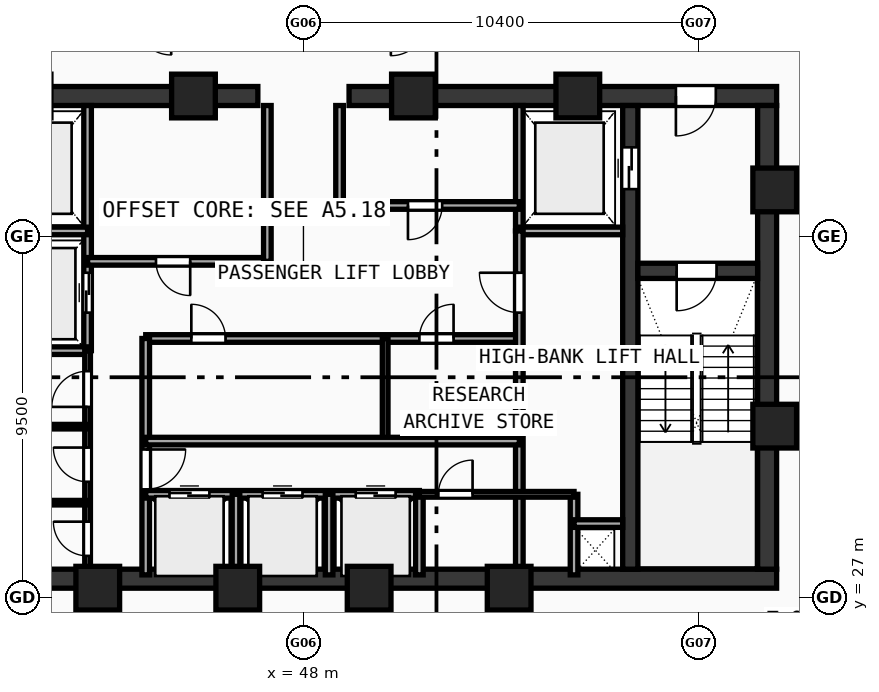
"""IFC4 building model, lengths in metres.
Left out: names, types, materials, properties, quantities, classifications, styles, units other than length and angle.
Written with IfcOpenShell. Run it as: python <this file> out.ifc"""

import sys

from ifc_helpers import new_model, si_unit, direction, frame, frame_2d, origin, origin_with_axes, origin_2d, place, context, subcontext, project, spatial, rectangle, hollow_rectangle, extrude, source, transform, mapped, element, fill, save


model = new_model("IFC4")
c1 = context("Model", 3, precision=1e-05, world=origin(), true_north=direction((0.0, 1.0)))
c2 = subcontext(c1, "Body", "Model", "MODEL_VIEW")
j1 = project(units=[si_unit("LENGTHUNIT", "METRE"), si_unit("PLANEANGLEUNIT", "RADIAN")], contexts=[c1])
p1 = place(None, origin())
s1 = spatial("IfcSite", under=j1, at=p1, CompositionType="ELEMENT")
p2 = place(p1, origin())
s2 = spatial("IfcBuilding", under=s1, at=p2, CompositionType="ELEMENT")
p3 = place(p2, frame((0.0, 0.0, 285.02)))
s3 = spatial("IfcBuildingStorey", under=s2, at=p3, CompositionType="ELEMENT", Elevation=285.02)
p4 = place(p3, frame((35.55, 27.5, 0.0), z_axis=(0.0, 0.0, 1.0), x_axis=(1.0, 0.0, 0.0)))
e1 = element("IfcWall", 1, at=p4, inside=s3, PredefinedType="SHEAR", context=c2, shape_type="SweptSolid", body=[
    extrude(rectangle(XDim=24.9, YDim=0.5, at=frame_2d((12.45, 0.0))), origin(), (0.0, 0.0, 1.0), 3.47),
])
p5 = place(p3, frame((35.55, 40.2, 0.0), z_axis=(0.0, 0.0, 1.0), x_axis=(1.0, 0.0, 0.0)))
e2 = element("IfcWall", 2, at=p5, inside=s3, PredefinedType="SHEAR", context=c2, shape_type="SweptSolid", body=[
    extrude(rectangle(XDim=11.25, YDim=0.5, at=frame_2d((5.625, 0.0))), origin(), (0.0, 0.0, 1.0), 3.47),
])
p6 = place(p5, frame((1.6, 0.0, 0.0)))
e3 = element("IfcOpeningElement", 3, at=p6, cuts=e2, PredefinedType="OPENING", context=c2, shape_type="SweptSolid", body=[
    extrude(rectangle(XDim=1.05, YDim=2.1, at=frame_2d((0.525, 1.05))), frame((0.0, 0.26, 0.0), z_axis=(0.0, -1.0, 0.0), x_axis=(1.0, 0.0, 0.0)), (0.0, 0.0, 1.0), 0.52),
])
p7 = place(p3, frame((49.2, 40.2, 0.0), z_axis=(0.0, 0.0, 1.0), x_axis=(1.0, 0.0, 0.0)))
e4 = element("IfcWall", 4, at=p7, inside=s3, PredefinedType="SHEAR", context=c2, shape_type="SweptSolid", body=[
    extrude(rectangle(XDim=11.25, YDim=0.5, at=frame_2d((5.625, 0.0))), origin(), (0.0, 0.0, 1.0), 3.47),
])
p8 = place(p7, frame((8.6, 0.0, 0.0)))
e5 = element("IfcOpeningElement", 5, at=p8, cuts=e4, PredefinedType="OPENING", context=c2, shape_type="SweptSolid", body=[
    extrude(rectangle(XDim=1.05, YDim=2.1, at=frame_2d((0.525, 1.05))), frame((0.0, 0.26, 0.0), z_axis=(0.0, -1.0, 0.0), x_axis=(1.0, 0.0, 0.0)), (0.0, 0.0, 1.0), 0.52),
])
p9 = place(p3, frame((60.2, 27.75, 0.0), z_axis=(0.0, 0.0, 1.0), x_axis=(0.0, 1.0, 0.0)))
e6 = element("IfcWall", 6, at=p9, inside=s3, PredefinedType="SHEAR", context=c2, shape_type="SweptSolid", body=[
    extrude(rectangle(XDim=12.2, YDim=0.5, at=frame_2d((6.1, 0.0))), origin(), (0.0, 0.0, 1.0), 3.47),
])
p10 = place(p3, frame((56.6, 27.75, 0.0), z_axis=(0.0, 0.0, 1.0), x_axis=(0.0, 1.0, 0.0)))
e7 = element("IfcWall", 7, at=p10, inside=s3, PredefinedType="SHEAR", context=c2, shape_type="SweptSolid", body=[
    extrude(rectangle(XDim=12.2, YDim=0.4, at=frame_2d((6.1, 0.0))), origin(), (0.0, 0.0, 1.0), 3.47),
])
p11 = place(p10, frame((10.0, 0.0, 0.0)))
e8 = element("IfcOpeningElement", 8, at=p11, cuts=e7, PredefinedType="OPENING", context=c2, shape_type="SweptSolid", body=[
    extrude(rectangle(XDim=1.1, YDim=2.1, at=frame_2d((0.55, 1.05))), frame((0.0, 0.21, 0.0), z_axis=(0.0, -1.0, 0.0), x_axis=(1.0, 0.0, 0.0)), (0.0, 0.0, 1.0), 0.42),
])
p12 = place(p3, frame((56.8, 35.6, 0.0), z_axis=(0.0, 0.0, 1.0), x_axis=(1.0, 0.0, 0.0)))
e9 = element("IfcWall", 9, at=p12, inside=s3, PredefinedType="SHEAR", context=c2, shape_type="SweptSolid", body=[
    extrude(rectangle(XDim=3.15, YDim=0.4, at=frame_2d((1.575, 0.0))), origin(), (0.0, 0.0, 1.0), 3.47),
])
p13 = place(p12, frame((1.02, 0.0, 0.0)))
e10 = element("IfcOpeningElement", 10, at=p13, cuts=e9, PredefinedType="OPENING", context=c2, shape_type="SweptSolid", body=[
    extrude(rectangle(XDim=1.05, YDim=2.1, at=frame_2d((0.525, 1.05))), frame((0.0, 0.21, 0.0), z_axis=(0.0, -1.0, 0.0), x_axis=(1.0, 0.0, 0.0)), (0.0, 0.0, 1.0), 0.42),
])
m1 = source(origin(), c2, "Body", "SweptSolid", [
    extrude(hollow_rectangle(XDim=1.15, YDim=1.15, WallThickness=0.048, at=origin_2d()), origin(), (0.0, 0.0, 1.0), 3.73),
])
for number, where, z_axis, x_axis in (
    (11, (42.588, 27.25, -0.26), (0.0, 0.0, 1.0), (1.0, 0.0, 0.0)),
    (12, (46.272, 27.25, -0.26), (0.0, 0.0, 1.0), (1.0, 0.0, 0.0)),
    (13, (49.729, 27.25, -0.26), (0.0, 0.0, 1.0), (1.0, 0.0, 0.0)),
    (14, (53.412, 27.25, -0.26), (0.0, 0.0, 1.0), (1.0, 0.0, 0.0)),
    (15, (60.4, 31.513, -0.26), (0.0, 0.0, 1.0), (1.0, 0.0, 0.0)),
    (16, (60.4, 37.729, -0.26), (0.0, 0.0, 1.0), (1.0, 0.0, 0.0)),
    (17, (55.219, 40.2, -0.26), (0.0, 0.0, 1.0), (1.0, 0.0, 0.0)),
    (18, (50.894, 40.2, -0.26), (0.0, 0.0, 1.0), (1.0, 0.0, 0.0)),
    (19, (45.106, 40.2, -0.26), (0.0, 0.0, 1.0), (1.0, 0.0, 0.0)),
):
    element("IfcColumn", number, at=place(p3, frame(where, z_axis=z_axis, x_axis=x_axis)), inside=s3, PredefinedType="COLUMN", context=c2, shape_type="MappedRepresentation", body=[
        mapped(m1, transform((0.0, 0.0, 0.0), scale=1.0)),
    ])
p14 = place(p3, frame((42.32, 33.5, 0.0), z_axis=(0.0, 0.0, 1.0), x_axis=(0.0, 1.0, 0.0)))
e20 = element("IfcWall", 20, at=p14, inside=s3, PredefinedType="SOLIDWALL", context=c2, shape_type="SweptSolid", body=[
    extrude(rectangle(XDim=6.45, YDim=0.2, at=frame_2d((3.225, 0.0))), origin(), (0.0, 0.0, 1.0), 3.47),
])
p15 = place(p14, frame((1.0, 0.0, 0.0)))
e21 = element("IfcOpeningElement", 21, at=p15, cuts=e20, PredefinedType="OPENING", context=c2, shape_type="SweptSolid", body=[
    extrude(rectangle(XDim=1.05, YDim=2.1, at=frame_2d((0.525, 1.05))), frame((0.0, 0.11, 0.0), z_axis=(0.0, -1.0, 0.0), x_axis=(1.0, 0.0, 0.0)), (0.0, 0.0, 1.0), 0.22),
])
for number, where, z_axis, x_axis in (
    (22, (39.6, 36.65, 0.0), (0.0, 0.0, 1.0), (1.0, 0.0, 0.0)),
    (23, (39.6, 33.5, 0.0), (0.0, 0.0, 1.0), (1.0, 0.0, 0.0)),
):
    element("IfcWall", number, at=place(p3, frame(where, z_axis=z_axis, x_axis=x_axis)), inside=s3, PredefinedType="SOLIDWALL", context=c2, shape_type="SweptSolid", body=[
        extrude(rectangle(XDim=2.72, YDim=0.2, at=frame_2d((1.36, 0.0))), origin(), (0.0, 0.0, 1.0), 3.47),
    ])
p16 = place(p3, frame((53.68, 36.65, 0.0), z_axis=(0.0, 0.0, 1.0), x_axis=(0.0, 1.0, 0.0)))
e24 = element("IfcWall", 24, at=p16, inside=s3, PredefinedType="SOLIDWALL", context=c2, shape_type="SweptSolid", body=[
    extrude(rectangle(XDim=3.3, YDim=0.2, at=frame_2d((1.65, 0.0))), origin(), (0.0, 0.0, 1.0), 3.47),
])
p17 = place(p3, frame((53.68, 36.65, 0.0), z_axis=(0.0, 0.0, 1.0), x_axis=(1.0, 0.0, 0.0)))
e25 = element("IfcWall", 25, at=p17, inside=s3, PredefinedType="SOLIDWALL", context=c2, shape_type="SweptSolid", body=[
    extrude(rectangle(XDim=2.72, YDim=0.2, at=frame_2d((1.36, 0.0))), origin(), (0.0, 0.0, 1.0), 3.47),
])
p18 = place(p3, frame((42.32, 35.85, 0.0), z_axis=(0.0, 0.0, 1.0), x_axis=(1.0, 0.0, 0.0)))
e26 = element("IfcWall", 26, at=p18, inside=s3, PredefinedType="SOLIDWALL", context=c2, shape_type="SweptSolid", body=[
    extrude(rectangle(XDim=4.73, YDim=0.2, at=frame_2d((2.365, 0.0))), origin(), (0.0, 0.0, 1.0), 3.47),
])
p19 = place(p18, frame((1.8, 0.0, 0.0)))
e27 = element("IfcOpeningElement", 27, at=p19, cuts=e26, PredefinedType="OPENING", context=c2, shape_type="SweptSolid", body=[
    extrude(rectangle(XDim=0.9, YDim=2.1, at=frame_2d((0.45, 1.05))), frame((0.0, 0.11, 0.0), z_axis=(0.0, -1.0, 0.0), x_axis=(1.0, 0.0, 0.0)), (0.0, 0.0, 1.0), 0.22),
])
p20 = place(p3, frame((48.95, 37.32, 0.0), z_axis=(0.0, 0.0, 1.0), x_axis=(1.0, 0.0, 0.0)))
e28 = element("IfcWall", 28, at=p20, inside=s3, PredefinedType="SOLIDWALL", context=c2, shape_type="SweptSolid", body=[
    extrude(rectangle(XDim=4.73, YDim=0.2, at=frame_2d((2.365, 0.0))), origin(), (0.0, 0.0, 1.0), 3.47),
])
p21 = place(p20, frame((1.8, 0.0, 0.0)))
e29 = element("IfcOpeningElement", 29, at=p21, cuts=e28, PredefinedType="OPENING", context=c2, shape_type="SweptSolid", body=[
    extrude(rectangle(XDim=0.9, YDim=2.1, at=frame_2d((0.45, 1.05))), frame((0.0, 0.11, 0.0), z_axis=(0.0, -1.0, 0.0), x_axis=(1.0, 0.0, 0.0)), (0.0, 0.0, 1.0), 0.22),
])
p22 = place(p3, frame((47.05, 35.85, 0.0), z_axis=(0.0, 0.0, 1.0), x_axis=(0.0, 1.0, 0.0)))
e30 = element("IfcWall", 30, at=p22, inside=s3, PredefinedType="SOLIDWALL", context=c2, shape_type="SweptSolid", body=[
    extrude(rectangle(XDim=4.1, YDim=0.2, at=frame_2d((2.05, 0.0))), origin(), (0.0, 0.0, 1.0), 3.47),
])
p23 = place(p3, frame((48.95, 37.32, 0.0), z_axis=(0.0, 0.0, 1.0), x_axis=(0.0, 1.0, 0.0)))
e31 = element("IfcWall", 31, at=p23, inside=s3, PredefinedType="SOLIDWALL", context=c2, shape_type="SweptSolid", body=[
    extrude(rectangle(XDim=2.63, YDim=0.2, at=frame_2d((1.315, 0.0))), origin(), (0.0, 0.0, 1.0), 3.47),
])
p24 = place(p3, frame((43.85, 33.82, 0.0), z_axis=(0.0, 0.0, 1.0), x_axis=(1.0, 0.0, 0.0)))
e32 = element("IfcWall", 32, at=p24, inside=s3, PredefinedType="SOLIDWALL", context=c2, shape_type="SweptSolid", body=[
    extrude(rectangle(XDim=9.83, YDim=0.2, at=frame_2d((4.915, 0.0))), origin(), (0.0, 0.0, 1.0), 3.47),
])
p25 = place(p24, frame((1.2, 0.0, 0.0)))
e33 = element("IfcOpeningElement", 33, at=p25, cuts=e32, PredefinedType="OPENING", context=c2, shape_type="SweptSolid", body=[
    extrude(rectangle(XDim=0.9, YDim=2.1, at=frame_2d((0.45, 1.05))), frame((0.0, 0.11, 0.0), z_axis=(0.0, -1.0, 0.0), x_axis=(1.0, 0.0, 0.0)), (0.0, 0.0, 1.0), 0.22),
])
p26 = place(p24, frame((7.2, 0.0, 0.0)))
e34 = element("IfcOpeningElement", 34, at=p26, cuts=e32, PredefinedType="OPENING", context=c2, shape_type="SweptSolid", body=[
    extrude(rectangle(XDim=0.9, YDim=2.1, at=frame_2d((0.45, 1.05))), frame((0.0, 0.11, 0.0), z_axis=(0.0, -1.0, 0.0), x_axis=(1.0, 0.0, 0.0)), (0.0, 0.0, 1.0), 0.22),
])
p27 = place(p3, frame((43.85, 27.6, 0.0), z_axis=(0.0, 0.0, 1.0), x_axis=(0.0, 1.0, 0.0)))
e35 = element("IfcWall", 35, at=p27, inside=s3, PredefinedType="SOLIDWALL", context=c2, shape_type="SweptSolid", body=[
    extrude(rectangle(XDim=6.22, YDim=0.2, at=frame_2d((3.11, 0.0))), origin(), (0.0, 0.0, 1.0), 3.47),
])
p28 = place(p27, frame((2.25, 0.0, 0.0)))
e36 = element("IfcOpeningElement", 36, at=p28, cuts=e35, PredefinedType="OPENING", context=c2, shape_type="SweptSolid", body=[
    extrude(rectangle(XDim=1.05, YDim=2.1, at=frame_2d((0.525, 1.05))), frame((0.0, 0.11, 0.0), z_axis=(0.0, -1.0, 0.0), x_axis=(1.0, 0.0, 0.0)), (0.0, 0.0, 1.0), 0.22),
])
p29 = place(p3, frame((53.68, 27.6, 0.0), z_axis=(0.0, 0.0, 1.0), x_axis=(0.0, 1.0, 0.0)))
e37 = element("IfcWall", 37, at=p29, inside=s3, PredefinedType="SOLIDWALL", context=c2, shape_type="SweptSolid", body=[
    extrude(rectangle(XDim=9.05, YDim=0.2, at=frame_2d((4.525, 0.0))), origin(), (0.0, 0.0, 1.0), 3.47),
])
p30 = place(p29, frame((6.9, 0.0, 0.0)))
e38 = element("IfcOpeningElement", 38, at=p30, cuts=e37, PredefinedType="OPENING", context=c2, shape_type="SweptSolid", body=[
    extrude(rectangle(XDim=1.05, YDim=2.1, at=frame_2d((0.525, 1.05))), frame((0.0, 0.11, 0.0), z_axis=(0.0, -1.0, 0.0), x_axis=(1.0, 0.0, 0.0)), (0.0, 0.0, 1.0), 0.22),
])
p31 = place(p3, frame((50.15, 31.12, 0.0), z_axis=(0.0, 0.0, 1.0), x_axis=(0.0, 1.0, 0.0)))
e39 = element("IfcWall", 39, at=p31, inside=s3, PredefinedType="PARTITIONING", context=c2, shape_type="SweptSolid", body=[
    extrude(rectangle(XDim=2.7, YDim=0.15, at=frame_2d((1.35, 0.0))), origin(), (0.0, 0.0, 1.0), 3.47),
])
p32 = place(p3, frame((43.85, 29.72, 0.0), z_axis=(0.0, 0.0, 1.0), x_axis=(1.0, 0.0, 0.0)))
e40 = element("IfcWall", 40, at=p32, inside=s3, PredefinedType="SOLIDWALL", context=c2, shape_type="SweptSolid", body=[
    extrude(rectangle(XDim=7.2, YDim=0.2, at=frame_2d((3.6, 0.0))), origin(), (0.0, 0.0, 1.0), 3.47),
])
p33 = place(p32, frame((0.625, 0.0, 0.0)))
e41 = element("IfcOpeningElement", 41, at=p33, cuts=e40, PredefinedType="OPENING", context=c2, shape_type="SweptSolid", body=[
    extrude(rectangle(XDim=1.05, YDim=2.1, at=frame_2d((0.525, 1.05))), frame((0.0, 0.11, 0.0), z_axis=(0.0, -1.0, 0.0), x_axis=(1.0, 0.0, 0.0)), (0.0, 0.0, 1.0), 0.22),
])
p34 = place(p32, frame((3.075, 0.0, 0.0)))
e42 = element("IfcOpeningElement", 42, at=p34, cuts=e40, PredefinedType="OPENING", context=c2, shape_type="SweptSolid", body=[
    extrude(rectangle(XDim=1.05, YDim=2.1, at=frame_2d((0.525, 1.05))), frame((0.0, 0.11, 0.0), z_axis=(0.0, -1.0, 0.0), x_axis=(1.0, 0.0, 0.0)), (0.0, 0.0, 1.0), 0.22),
])
p35 = place(p32, frame((5.525, 0.0, 0.0)))
e43 = element("IfcOpeningElement", 43, at=p35, cuts=e40, PredefinedType="OPENING", context=c2, shape_type="SweptSolid", body=[
    extrude(rectangle(XDim=1.05, YDim=2.1, at=frame_2d((0.525, 1.05))), frame((0.0, 0.11, 0.0), z_axis=(0.0, -1.0, 0.0), x_axis=(1.0, 0.0, 0.0)), (0.0, 0.0, 1.0), 0.22),
])
p36 = place(p3, frame((51.05, 27.6, 0.0), z_axis=(0.0, 0.0, 1.0), x_axis=(0.0, 1.0, 0.0)))
e44 = element("IfcWall", 44, at=p36, inside=s3, PredefinedType="SOLIDWALL", context=c2, shape_type="SweptSolid", body=[
    extrude(rectangle(XDim=2.12, YDim=0.2, at=frame_2d((1.06, 0.0))), origin(), (0.0, 0.0, 1.0), 3.47),
])
p37 = place(p3, frame((43.85, 31.12, 0.0), z_axis=(0.0, 0.0, 1.0), x_axis=(1.0, 0.0, 0.0)))
e45 = element("IfcWall", 45, at=p37, inside=s3, PredefinedType="SOLIDWALL", context=c2, shape_type="SweptSolid", body=[
    extrude(rectangle(XDim=9.83, YDim=0.2, at=frame_2d((4.915, 0.0))), origin(), (0.0, 0.0, 1.0), 3.47),
])
for number, where, z_axis, x_axis in (
    (46, (46.225, 27.6, 0.0), (0.0, 0.0, 1.0), (0.0, 1.0, 0.0)),
    (47, (48.675, 27.6, 0.0), (0.0, 0.0, 1.0), (0.0, 1.0, 0.0)),
    (48, (55.12, 27.6, 0.0), (0.0, 0.0, 1.0), (0.0, 1.0, 0.0)),
):
    element("IfcWall", number, at=place(p3, frame(where, z_axis=z_axis, x_axis=x_axis)), inside=s3, PredefinedType="SOLIDWALL", context=c2, shape_type="SweptSolid", body=[
        extrude(rectangle(XDim=2.12, YDim=0.2, at=frame_2d((1.06, 0.0))), origin(), (0.0, 0.0, 1.0), 3.47),
    ])
p38 = place(p3, frame((55.12, 28.95, 0.0), z_axis=(0.0, 0.0, 1.0), x_axis=(1.0, 0.0, 0.0)))
e49 = element("IfcWall", 49, at=p38, inside=s3, PredefinedType="SOLIDWALL", context=c2, shape_type="SweptSolid", body=[
    extrude(rectangle(XDim=1.28, YDim=0.2, at=frame_2d((0.64, 0.0))), origin(), (0.0, 0.0, 1.0), 3.47),
])
p39 = place(p3, frame((42.32, 27.6, 0.0), z_axis=(0.0, 0.0, 1.0), x_axis=(0.0, 1.0, 0.0)))
e50 = element("IfcWall", 50, at=p39, inside=s3, PredefinedType="PARTITIONING", context=c2, shape_type="SweptSolid", body=[
    extrude(rectangle(XDim=5.9, YDim=0.15, at=frame_2d((2.95, 0.0))), origin(), (0.0, 0.0, 1.0), 3.47),
])
p40 = place(p39, frame((0.5, 0.0, 0.0)))
e51 = element("IfcOpeningElement", 51, at=p40, cuts=e50, PredefinedType="OPENING", context=c2, shape_type="SweptSolid", body=[
    extrude(rectangle(XDim=0.9, YDim=2.1, at=frame_2d((0.45, 1.05))), frame((0.0, 0.085, 0.0), z_axis=(0.0, -1.0, 0.0), x_axis=(1.0, 0.0, 0.0)), (0.0, 0.0, 1.0), 0.17),
])
p41 = place(p39, frame((2.45, 0.0, 0.0)))
e52 = element("IfcOpeningElement", 52, at=p41, cuts=e50, PredefinedType="OPENING", context=c2, shape_type="SweptSolid", body=[
    extrude(rectangle(XDim=0.9, YDim=2.1, at=frame_2d((0.45, 1.05))), frame((0.0, 0.085, 0.0), z_axis=(0.0, -1.0, 0.0), x_axis=(1.0, 0.0, 0.0)), (0.0, 0.0, 1.0), 0.17),
])
p42 = place(p39, frame((4.42, 0.0, 0.0)))
e53 = element("IfcOpeningElement", 53, at=p42, cuts=e50, PredefinedType="OPENING", context=c2, shape_type="SweptSolid", body=[
    extrude(rectangle(XDim=0.94, YDim=2.1, at=frame_2d((0.47, 1.05))), frame((0.0, 0.085, 0.0), z_axis=(0.0, -1.0, 0.0), x_axis=(1.0, 0.0, 0.0)), (0.0, 0.0, 1.0), 0.17),
])
p43 = place(p3, frame((51.05, 29.72, 0.0), z_axis=(0.0, 0.0, 1.0), x_axis=(1.0, 0.0, 0.0)))
e54 = element("IfcWall", 54, at=p43, inside=s3, PredefinedType="PARTITIONING", context=c2, shape_type="SweptSolid", body=[
    extrude(rectangle(XDim=4.07, YDim=0.15, at=frame_2d((2.035, 0.0))), origin(), (0.0, 0.0, 1.0), 3.47),
])
p44 = place(p43, frame((0.5, 0.0, 0.0)))
e55 = element("IfcOpeningElement", 55, at=p44, cuts=e54, PredefinedType="OPENING", context=c2, shape_type="SweptSolid", body=[
    extrude(rectangle(XDim=0.9, YDim=2.1, at=frame_2d((0.45, 1.05))), frame((0.0, 0.085, 0.0), z_axis=(0.0, -1.0, 0.0), x_axis=(1.0, 0.0, 0.0)), (0.0, 0.0, 1.0), 0.17),
])
for number, where, z_axis, x_axis in (
    (56, (39.6, 29.5, 0.0), (0.0, 0.0, 1.0), (1.0, 0.0, 0.0)),
    (57, (39.6, 31.5, 0.0), (0.0, 0.0, 1.0), (1.0, 0.0, 0.0)),
):
    element("IfcWall", number, at=place(p3, frame(where, z_axis=z_axis, x_axis=x_axis)), inside=s3, PredefinedType="PARTITIONING", context=c2, shape_type="SweptSolid", body=[
        extrude(rectangle(XDim=2.72, YDim=0.12, at=frame_2d((1.36, 0.0))), origin(), (0.0, 0.0, 1.0), 3.47),
    ])
m2 = source(origin(), c2, "Body", "SweptSolid", [
    extrude(rectangle(XDim=1.05, YDim=2.1, at=frame_2d((0.525, 1.05))), frame((0.0, 0.025, 0.0), z_axis=(0.0, -1.0, 0.0), x_axis=(1.0, 0.0, 0.0)), (0.0, 0.0, 1.0), 0.05),
])
p45 = place(p13, frame((1.05, 0.0, 0.0), z_axis=(0.0, 0.0, 1.0), x_axis=(-1.0, 0.0, 0.0)))
e58 = element("IfcDoor", 58, at=p45, inside=s3, OperationType="SINGLE_SWING_RIGHT", PredefinedType="DOOR", context=c2, shape_type="MappedRepresentation", body=[
    mapped(m2, transform((0.0, 0.0, 0.0), scale=1.0)),
])
fill(e10, e58)
p46 = place(p8, frame((1.05, 0.0, 0.0), z_axis=(0.0, 0.0, 1.0), x_axis=(-1.0, 0.0, 0.0)))
e59 = element("IfcDoor", 59, at=p46, inside=s3, OperationType="SINGLE_SWING_RIGHT", PredefinedType="DOOR", context=c2, shape_type="MappedRepresentation", body=[
    mapped(m2, transform((0.0, 0.0, 0.0), scale=1.0)),
])
fill(e5, e59)
m3 = source(origin(), c2, "Body", "SweptSolid", [
    extrude(rectangle(XDim=1.1, YDim=2.1, at=frame_2d((0.55, 1.05))), frame((0.0, 0.025, 0.0), z_axis=(0.0, -1.0, 0.0), x_axis=(1.0, 0.0, 0.0)), (0.0, 0.0, 1.0), 0.05),
])
p47 = place(p11, origin_with_axes())
e60 = element("IfcDoor", 60, at=p47, inside=s3, OperationType="DOUBLE_DOOR_SLIDING", PredefinedType="DOOR", context=c2, shape_type="MappedRepresentation", body=[
    mapped(m3, transform((0.0, 0.0, 0.0), scale=1.0)),
])
fill(e8, e60)
p48 = place(p15, origin_with_axes())
e61 = element("IfcDoor", 61, at=p48, inside=s3, OperationType="DOUBLE_DOOR_SLIDING", PredefinedType="DOOR", context=c2, shape_type="MappedRepresentation", body=[
    mapped(m2, transform((0.0, 0.0, 0.0), scale=1.0)),
])
fill(e21, e61)
m4 = source(origin(), c2, "Body", "SweptSolid", [
    extrude(rectangle(XDim=0.9, YDim=2.1, at=frame_2d((0.45, 1.05))), frame((0.0, 0.025, 0.0), z_axis=(0.0, -1.0, 0.0), x_axis=(1.0, 0.0, 0.0)), (0.0, 0.0, 1.0), 0.05),
])
p49 = place(p19, frame((0.9, 0.0, 0.0), z_axis=(0.0, 0.0, 1.0), x_axis=(-1.0, 0.0, 0.0)))
e62 = element("IfcDoor", 62, at=p49, inside=s3, OperationType="SINGLE_SWING_LEFT", PredefinedType="DOOR", context=c2, shape_type="MappedRepresentation", body=[
    mapped(m4, transform((0.0, 0.0, 0.0), scale=1.0)),
])
fill(e27, e62)
p50 = place(p21, frame((0.9, 0.0, 0.0), z_axis=(0.0, 0.0, 1.0), x_axis=(-1.0, 0.0, 0.0)))
e63 = element("IfcDoor", 63, at=p50, inside=s3, OperationType="SINGLE_SWING_RIGHT", PredefinedType="DOOR", context=c2, shape_type="MappedRepresentation", body=[
    mapped(m4, transform((0.0, 0.0, 0.0), scale=1.0)),
])
fill(e29, e63)
p51 = place(p25, origin_with_axes())
e64 = element("IfcDoor", 64, at=p51, inside=s3, OperationType="SINGLE_SWING_LEFT", PredefinedType="DOOR", context=c2, shape_type="MappedRepresentation", body=[
    mapped(m4, transform((0.0, 0.0, 0.0), scale=1.0)),
])
fill(e33, e64)
p52 = place(p26, origin_with_axes())
e65 = element("IfcDoor", 65, at=p52, inside=s3, OperationType="SINGLE_SWING_RIGHT", PredefinedType="DOOR", context=c2, shape_type="MappedRepresentation", body=[
    mapped(m4, transform((0.0, 0.0, 0.0), scale=1.0)),
])
fill(e34, e65)
p53 = place(p28, frame((1.05, 0.0, 0.0), z_axis=(0.0, 0.0, 1.0), x_axis=(-1.0, 0.0, 0.0)))
e66 = element("IfcDoor", 66, at=p53, inside=s3, OperationType="SINGLE_SWING_LEFT", PredefinedType="DOOR", context=c2, shape_type="MappedRepresentation", body=[
    mapped(m2, transform((0.0, 0.0, 0.0), scale=1.0)),
])
fill(e36, e66)
p54 = place(p30, origin_with_axes())
e67 = element("IfcDoor", 67, at=p54, inside=s3, OperationType="SINGLE_SWING_RIGHT", PredefinedType="DOOR", context=c2, shape_type="MappedRepresentation", body=[
    mapped(m2, transform((0.0, 0.0, 0.0), scale=1.0)),
])
fill(e38, e67)
p55 = place(p33, origin_with_axes())
e68 = element("IfcDoor", 68, at=p55, inside=s3, OperationType="DOUBLE_DOOR_SLIDING", PredefinedType="DOOR", context=c2, shape_type="MappedRepresentation", body=[
    mapped(m2, transform((0.0, 0.0, 0.0), scale=1.0)),
])
fill(e41, e68)
p56 = place(p34, origin_with_axes())
e69 = element("IfcDoor", 69, at=p56, inside=s3, OperationType="DOUBLE_DOOR_SLIDING", PredefinedType="DOOR", context=c2, shape_type="MappedRepresentation", body=[
    mapped(m2, transform((0.0, 0.0, 0.0), scale=1.0)),
])
fill(e42, e69)
p57 = place(p35, origin_with_axes())
e70 = element("IfcDoor", 70, at=p57, inside=s3, OperationType="DOUBLE_DOOR_SLIDING", PredefinedType="DOOR", context=c2, shape_type="MappedRepresentation", body=[
    mapped(m2, transform((0.0, 0.0, 0.0), scale=1.0)),
])
fill(e43, e70)
p58 = place(p40, origin_with_axes())
e71 = element("IfcDoor", 71, at=p58, inside=s3, OperationType="SINGLE_SWING_RIGHT", PredefinedType="DOOR", context=c2, shape_type="MappedRepresentation", body=[
    mapped(m4, transform((0.0, 0.0, 0.0), scale=1.0)),
])
fill(e51, e71)
p59 = place(p41, origin_with_axes())
e72 = element("IfcDoor", 72, at=p59, inside=s3, OperationType="SINGLE_SWING_RIGHT", PredefinedType="DOOR", context=c2, shape_type="MappedRepresentation", body=[
    mapped(m4, transform((0.0, 0.0, 0.0), scale=1.0)),
])
fill(e52, e72)
m5 = source(origin(), c2, "Body", "SweptSolid", [
    extrude(rectangle(XDim=0.94, YDim=2.1, at=frame_2d((0.47, 1.05))), frame((0.0, 0.025, 0.0), z_axis=(0.0, -1.0, 0.0), x_axis=(1.0, 0.0, 0.0)), (0.0, 0.0, 1.0), 0.05),
])
p60 = place(p42, origin_with_axes())
e73 = element("IfcDoor", 73, at=p60, inside=s3, OperationType="SINGLE_SWING_LEFT", PredefinedType="DOOR", context=c2, shape_type="MappedRepresentation", body=[
    mapped(m5, transform((0.0, 0.0, 0.0), scale=1.0)),
])
fill(e53, e73)
p61 = place(p44, origin_with_axes())
e74 = element("IfcDoor", 74, at=p61, inside=s3, OperationType="SINGLE_SWING_RIGHT", PredefinedType="DOOR", context=c2, shape_type="MappedRepresentation", body=[
    mapped(m4, transform((0.0, 0.0, 0.0), scale=1.0)),
])
fill(e55, e74)
save(model, sys.argv[1])
